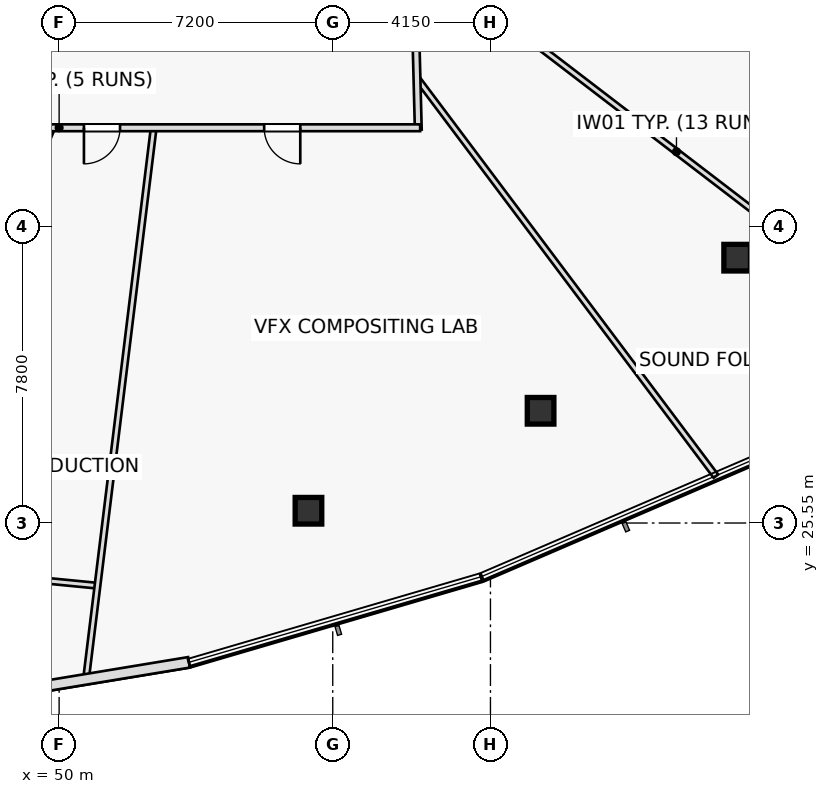
"""IFC4 building model, lengths in metres.
Left out: names, types, materials, properties, quantities, classifications, styles, units other than length and angle.
Written with IfcOpenShell. Run it as: python <this file> out.ifc"""

import sys

from ifc_helpers import new_model, si_unit, direction, frame, frame_2d, origin, origin_2d, place, context, subcontext, project, spatial, rectangle, hollow_rectangle, extrude, element, fill, save


model = new_model("IFC4")
c1 = context("Model", 3, precision=1e-05, world=origin(), true_north=direction((0.0, 1.0)))
c2 = subcontext(c1, "Body", "Model", "MODEL_VIEW")
j1 = project(units=[si_unit("LENGTHUNIT", "METRE"), si_unit("PLANEANGLEUNIT", "RADIAN")], contexts=[c1])
p1 = place(None, origin())
s1 = spatial("IfcSite", under=j1, at=p1, CompositionType="ELEMENT")
p2 = place(p1, origin())
s2 = spatial("IfcBuilding", under=s1, at=p2, CompositionType="ELEMENT")
p3 = place(p2, frame((0.0, 0.0, 115.6)))
s3 = spatial("IfcBuildingStorey", under=s2, at=p3, CompositionType="ELEMENT", Elevation=115.6)
for number, where, z_axis, x_axis in (
    (1, (56.561, 25.873, 0.0), (0.0, 0.0, 1.0), (1.0, 0.0, 0.0)),
    (2, (62.669, 28.503, 0.0), (0.0, 0.0, 1.0), (1.0, 0.0, 0.0)),
    (3, (67.842, 32.532, 0.0), (0.0, 0.0, 1.0), (1.0, 0.0, 0.0)),
):
    element("IfcColumn", number, at=place(p3, frame(where, z_axis=z_axis, x_axis=x_axis)), inside=s3, PredefinedType="COLUMN", context=c2, shape_type="SweptSolid", body=[
        extrude(hollow_rectangle(XDim=0.7, YDim=0.7, WallThickness=0.04, at=origin_2d()), origin(), (0.0, 0.0, 1.0), 3.55),
    ])
p4 = place(p3, frame((39.589, 25.018, 0.0), z_axis=(0.0, 0.0, 1.0), x_axis=(0.99524905582, -0.097361783517, 0.0)))
e4 = element("IfcWall", 4, at=p4, inside=s3, PredefinedType="PARTITIONING", context=c2, shape_type="SweptSolid", body=[
    extrude(rectangle(XDim=11.467, YDim=0.15, at=frame_2d((5.733, 0.0))), origin(), (0.0, 0.0, 1.0), 2.835),
])
p5 = place(p3, frame((52.489, 35.95, 0.0), z_axis=(0.0, 0.0, 1.0), x_axis=(-0.121867943368, -0.992546323543, 0.0)))
e5 = element("IfcWall", 5, at=p5, inside=s3, PredefinedType="PARTITIONING", context=c2, shape_type="SweptSolid", body=[
    extrude(rectangle(XDim=14.632, YDim=0.15, at=frame_2d((7.316, 0.0))), origin(), (0.0, 0.0, 1.0), 2.975),
])
p6 = place(p3, frame((59.416, 37.256, 0.0), z_axis=(0.0, 0.0, 1.0), x_axis=(0.60052474056, -0.799606175549, 0.0)))
e6 = element("IfcWall", 6, at=p6, inside=s3, PredefinedType="PARTITIONING", context=c2, shape_type="SweptSolid", body=[
    extrude(rectangle(XDim=13.098, YDim=0.15, at=frame_2d((6.549, 0.0))), origin(), (0.0, 0.0, 1.0), 2.835),
])
p7 = place(p3, frame((59.329, 40.614, 0.0), z_axis=(0.0, 0.0, 1.0), x_axis=(0.794014010307, -0.607899458329, 0.0)))
e7 = element("IfcWall", 7, at=p7, inside=s3, PredefinedType="PARTITIONING", context=c2, shape_type="SweptSolid", body=[
    extrude(rectangle(XDim=17.42, YDim=0.15, at=frame_2d((8.71, 0.0))), origin(), (0.0, 0.0, 1.0), 2.835),
])
p8 = place(p7, frame((1.35, 0.0, 0.0)))
e8 = element("IfcOpeningElement", 8, at=p8, cuts=e7, PredefinedType="OPENING", context=c2, shape_type="SweptSolid", body=[
    extrude(rectangle(XDim=0.95, YDim=2.05, at=frame_2d((0.475, 1.025))), frame((0.0, 0.085, 0.0), z_axis=(0.0, -1.0, 0.0), x_axis=(1.0, 0.0, 0.0)), (0.0, 0.0, 1.0), 0.17),
])
p9 = place(p3, frame((49.817, 35.95, 0.0), z_axis=(0.0, 0.0, 1.0), x_axis=(-0.385665325274, -0.922638746683, 0.0)))
e9 = element("IfcWall", 9, at=p9, inside=s3, PredefinedType="PARTITIONING", context=c2, shape_type="SweptSolid", body=[
    extrude(rectangle(XDim=16.771, YDim=0.15, at=frame_2d((8.385, 0.0))), origin(), (0.0, 0.0, 1.0), 2.835),
])
p10 = place(p3, frame((59.316, 41.1, 0.0), z_axis=(0.0, 0.0, 1.0), x_axis=(0.025953695765, -0.999663146103, 0.0)))
e10 = element("IfcWall", 10, at=p10, inside=s3, PredefinedType="PARTITIONING", context=c2, shape_type="SweptSolid", body=[
    extrude(rectangle(XDim=5.202, YDim=0.18, at=frame_2d((2.601, 0.0))), origin(), (0.0, 0.0, 1.0), 2.835),
])
p11 = place(p10, frame((1.831, 0.0, 0.0)))
e11 = element("IfcOpeningElement", 11, at=p11, cuts=e10, PredefinedType="OPENING", context=c2, shape_type="SweptSolid", body=[
    extrude(rectangle(XDim=0.95, YDim=2.05, at=frame_2d((0.475, 1.025))), frame((0.0, 0.1, 0.0), z_axis=(0.0, -1.0, 0.0), x_axis=(1.0, 0.0, 0.0)), (0.0, 0.0, 1.0), 0.2),
])
p12 = place(p3, frame((59.5, 35.95, 0.0), z_axis=(0.0, 0.0, 1.0), x_axis=(-1.0, 0.0, 0.0)))
e12 = element("IfcWall", 12, at=p12, inside=s3, PredefinedType="PARTITIONING", context=c2, shape_type="SweptSolid", body=[
    extrude(rectangle(XDim=19.0, YDim=0.18, at=frame_2d((9.5, 0.0))), origin(), (0.0, 0.0, 1.0), 2.835),
])
p13 = place(p12, frame((3.155, 0.0, 0.0)))
e13 = element("IfcOpeningElement", 13, at=p13, cuts=e12, PredefinedType="OPENING", context=c2, shape_type="SweptSolid", body=[
    extrude(rectangle(XDim=0.95, YDim=2.05, at=frame_2d((0.475, 1.025))), frame((0.0, 0.1, 0.0), z_axis=(0.0, -1.0, 0.0), x_axis=(1.0, 0.0, 0.0)), (0.0, 0.0, 1.0), 0.2),
])
p14 = place(p12, frame((7.897, 0.0, 0.0)))
e14 = element("IfcOpeningElement", 14, at=p14, cuts=e12, PredefinedType="OPENING", context=c2, shape_type="SweptSolid", body=[
    extrude(rectangle(XDim=0.95, YDim=2.05, at=frame_2d((0.475, 1.025))), frame((0.0, 0.1, 0.0), z_axis=(0.0, -1.0, 0.0), x_axis=(1.0, 0.0, 0.0)), (0.0, 0.0, 1.0), 0.2),
])
p15 = place(p12, frame((13.774, 0.0, 0.0)))
e15 = element("IfcOpeningElement", 15, at=p15, cuts=e12, PredefinedType="OPENING", context=c2, shape_type="SweptSolid", body=[
    extrude(rectangle(XDim=0.95, YDim=2.05, at=frame_2d((0.475, 1.025))), frame((0.0, 0.1, 0.0), z_axis=(0.0, -1.0, 0.0), x_axis=(1.0, 0.0, 0.0)), (0.0, 0.0, 1.0), 0.2),
])
p16 = place(p3, frame((45.485, 20.575, 0.0), z_axis=(0.0, 0.0, 1.0), x_axis=(0.986644726954, 0.162887024572, 0.0)))
e16 = element("IfcWall", 16, at=p16, inside=s3, PredefinedType="STANDARD", context=c2, shape_type="SweptSolid", body=[
    extrude(rectangle(XDim=8.04, YDim=0.28, at=frame_2d((4.02, 0.0))), origin(), (0.0, 0.0, 1.0), 3.55),
])
p17 = place(p13, origin())
e17 = element("IfcDoor", 17, at=p17, inside=s3, OperationType="SINGLE_SWING_LEFT", PredefinedType="DOOR", context=c2, shape_type="SweptSolid", body=[
    extrude(rectangle(XDim=0.95, YDim=2.05, at=frame_2d((0.475, 1.025))), frame((0.0, 0.025, 0.0), z_axis=(0.0, -1.0, 0.0), x_axis=(1.0, 0.0, 0.0)), (0.0, 0.0, 1.0), 0.05),
])
fill(e13, e17)
p18 = place(p14, origin())
e18 = element("IfcDoor", 18, at=p18, inside=s3, OperationType="SINGLE_SWING_RIGHT", PredefinedType="DOOR", context=c2, shape_type="SweptSolid", body=[
    extrude(rectangle(XDim=0.95, YDim=2.05, at=frame_2d((0.475, 1.025))), frame((0.0, 0.025, 0.0), z_axis=(0.0, -1.0, 0.0), x_axis=(1.0, 0.0, 0.0)), (0.0, 0.0, 1.0), 0.05),
])
fill(e14, e18)
save(model, sys.argv[1])
